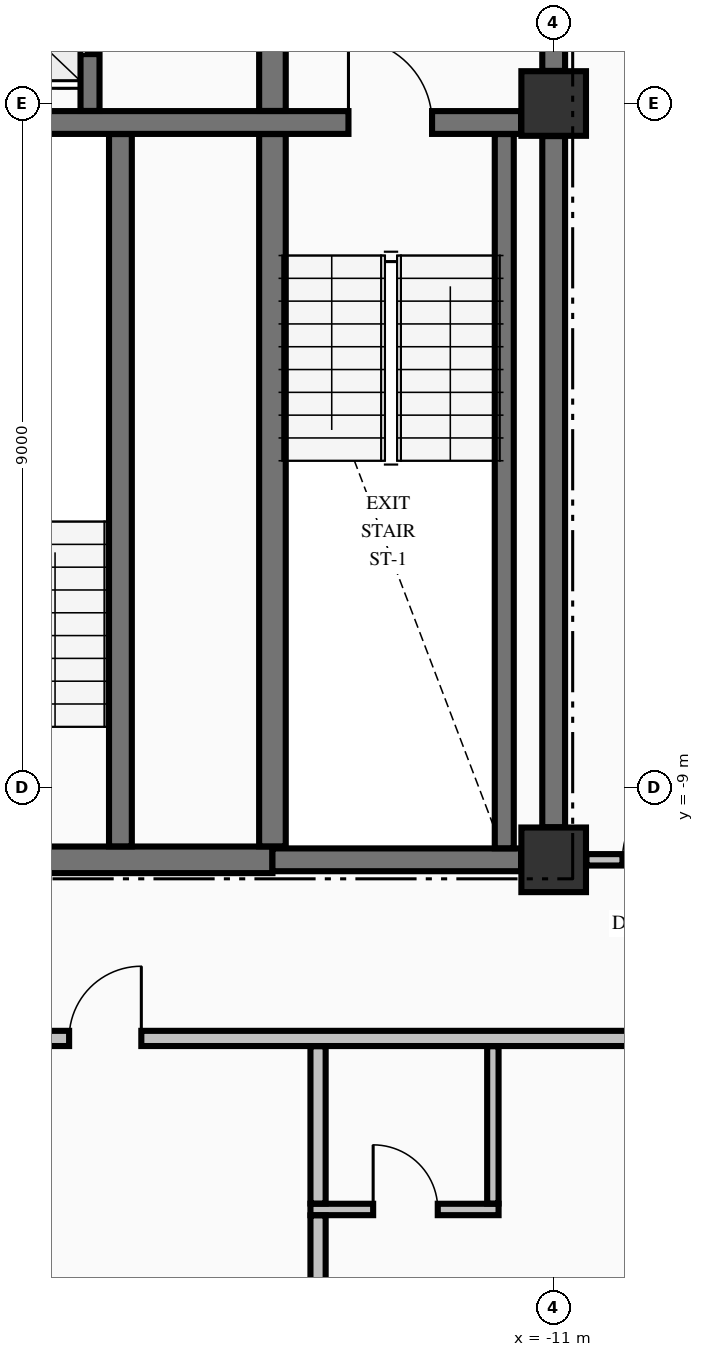
"""IFC4 building model, lengths in metres.
Left out: names, types, materials, properties, quantities, classifications, styles, units other than length and angle.
Written with IfcOpenShell. Run it as: python <this file> out.ifc"""

import sys

from ifc_helpers import new_model, si_unit, direction, frame, frame_2d, origin, origin_2d, place, context, subcontext, project, spatial, rectangle, extrude, element, fill, save


model = new_model("IFC4")
c1 = context("Model", 3, precision=1e-05, world=origin(), true_north=direction((0.0, 1.0)))
c2 = subcontext(c1, "Body", "Model", "MODEL_VIEW")
j1 = project(units=[si_unit("LENGTHUNIT", "METRE"), si_unit("PLANEANGLEUNIT", "RADIAN")], contexts=[c1])
p1 = place(None, origin())
s1 = spatial("IfcSite", under=j1, at=p1, CompositionType="ELEMENT")
p2 = place(p1, origin())
s2 = spatial("IfcBuilding", under=s1, at=p2, CompositionType="ELEMENT")
p3 = place(p2, frame((0.0, 0.0, 211.86)))
s3 = spatial("IfcBuildingStorey", under=s2, at=p3, CompositionType="ELEMENT", Elevation=211.86)
for number, where, z_axis, x_axis in (
    (1, (-11.0, -9.95, -0.325), (0.0, 0.0, 1.0), (1.0, 0.0, 0.0)),
    (2, (-11.0, 0.0, -0.325), (0.0, 0.0, 1.0), (1.0, 0.0, 0.0)),
):
    element("IfcColumn", number, at=place(p3, frame(where, z_axis=z_axis, x_axis=x_axis)), inside=s3, PredefinedType="COLUMN", context=c2, shape_type="SweptSolid", body=[
        extrude(rectangle(XDim=0.85, YDim=0.85, at=origin_2d()), origin(), (0.0, 0.0, 1.0), 3.475),
    ])
p4 = place(p3, frame((-19.571, -9.95, 0.0), z_axis=(0.0, 0.0, 1.0), x_axis=(1.0, 0.0, 0.0)))
e3 = element("IfcWall", 3, at=p4, inside=s3, PredefinedType="SHEAR", context=c2, shape_type="SweptSolid", body=[
    extrude(rectangle(XDim=4.871, YDim=0.35, at=frame_2d((2.436, 0.0))), origin(), (0.0, 0.0, 1.0), 3.15),
])
p5 = place(p4, frame((0.746, 0.0, 0.0)))
e4 = element("IfcOpeningElement", 4, at=p5, cuts=e3, PredefinedType="OPENING", context=c2, shape_type="SweptSolid", body=[
    extrude(rectangle(XDim=1.05, YDim=2.15, at=frame_2d((0.525, 1.075))), frame((0.0, 0.185, 0.0), z_axis=(0.0, -1.0, 0.0), x_axis=(1.0, 0.0, 0.0)), (0.0, 0.0, 1.0), 0.37),
])
p6 = place(p3, frame((-14.7, -9.95, 0.0), z_axis=(0.0, 0.0, 1.0), x_axis=(1.0, 0.0, 0.0)))
e5 = element("IfcWall", 5, at=p6, inside=s3, PredefinedType="SHEAR", context=c2, shape_type="SweptSolid", body=[
    extrude(rectangle(XDim=3.271, YDim=0.3, at=frame_2d((1.635, 0.0))), origin(), (0.0, 0.0, 1.0), 3.15),
])
p7 = place(p3, frame((-19.571, -0.25, 0.0), z_axis=(0.0, 0.0, 1.0), x_axis=(1.0, 0.0, 0.0)))
e6 = element("IfcWall", 6, at=p7, inside=s3, PredefinedType="SHEAR", context=c2, shape_type="SweptSolid", body=[
    extrude(rectangle(XDim=8.142, YDim=0.3, at=frame_2d((4.071, 0.0))), origin(), (0.0, 0.0, 1.0), 3.15),
])
p8 = place(p7, frame((5.871, 0.0, 0.0)))
e7 = element("IfcOpeningElement", 7, at=p8, cuts=e6, PredefinedType="OPENING", context=c2, shape_type="SweptSolid", body=[
    extrude(rectangle(XDim=1.1, YDim=2.15, at=frame_2d((0.55, 1.075))), frame((0.0, 0.16, 0.0), z_axis=(0.0, -1.0, 0.0), x_axis=(1.0, 0.0, 0.0)), (0.0, 0.0, 1.0), 0.32),
])
p9 = place(p3, frame((-14.2, -14.55, 0.0), z_axis=(0.0, 0.0, 1.0), x_axis=(1.0, 0.0, 0.0)))
e8 = element("IfcWall", 8, at=p9, inside=s3, PredefinedType="PARTITIONING", context=c2, shape_type="SweptSolid", body=[
    extrude(rectangle(XDim=2.475, YDim=0.15, at=frame_2d((1.237, 0.0))), origin(), (0.0, 0.0, 1.0), 3.15),
])
p10 = place(p9, frame((0.825, 0.0, 0.0)))
e9 = element("IfcOpeningElement", 9, at=p10, cuts=e8, PredefinedType="OPENING", context=c2, shape_type="SweptSolid", body=[
    extrude(rectangle(XDim=0.85, YDim=2.1, at=frame_2d((0.425, 1.05))), frame((0.0, 0.085, 0.0), z_axis=(0.0, -1.0, 0.0), x_axis=(1.0, 0.0, 0.0)), (0.0, 0.0, 1.0), 0.17),
])
p11 = place(p3, frame((-22.1, -12.3, 0.0), z_axis=(0.0, 0.0, 1.0), x_axis=(1.0, 0.0, 0.0)))
e10 = element("IfcWall", 10, at=p11, inside=s3, PredefinedType="PARTITIONING", context=c2, shape_type="SweptSolid", body=[
    extrude(rectangle(XDim=39.2, YDim=0.2, at=frame_2d((19.6, 0.0))), origin(), (0.0, 0.0, 1.0), 3.15),
])
p12 = place(p11, frame((4.725, 0.0, 0.0)))
e11 = element("IfcOpeningElement", 11, at=p12, cuts=e10, PredefinedType="OPENING", context=c2, shape_type="SweptSolid", body=[
    extrude(rectangle(XDim=0.95, YDim=2.15, at=frame_2d((0.475, 1.075))), frame((0.0, 0.11, 0.0), z_axis=(0.0, -1.0, 0.0), x_axis=(1.0, 0.0, 0.0)), (0.0, 0.0, 1.0), 0.22),
])
p13 = place(p11, frame((12.625, 0.0, 0.0)))
e12 = element("IfcOpeningElement", 12, at=p13, cuts=e10, PredefinedType="OPENING", context=c2, shape_type="SweptSolid", body=[
    extrude(rectangle(XDim=0.95, YDim=2.15, at=frame_2d((0.475, 1.075))), frame((0.0, 0.11, 0.0), z_axis=(0.0, -1.0, 0.0), x_axis=(1.0, 0.0, 0.0)), (0.0, 0.0, 1.0), 0.22),
])
p14 = place(p11, frame((19.375, 0.0, 0.0)))
e13 = element("IfcOpeningElement", 13, at=p14, cuts=e10, PredefinedType="OPENING", context=c2, shape_type="SweptSolid", body=[
    extrude(rectangle(XDim=0.95, YDim=2.15, at=frame_2d((0.475, 1.075))), frame((0.0, 0.11, 0.0), z_axis=(0.0, -1.0, 0.0), x_axis=(1.0, 0.0, 0.0)), (0.0, 0.0, 1.0), 0.22),
])
p15 = place(p11, frame((30.375, 0.0, 0.0)))
e14 = element("IfcOpeningElement", 14, at=p15, cuts=e10, PredefinedType="OPENING", context=c2, shape_type="SweptSolid", body=[
    extrude(rectangle(XDim=0.95, YDim=2.15, at=frame_2d((0.475, 1.075))), frame((0.0, 0.11, 0.0), z_axis=(0.0, -1.0, 0.0), x_axis=(1.0, 0.0, 0.0)), (0.0, 0.0, 1.0), 0.22),
])
p16 = place(p3, frame((-10.569, -9.95, 0.0), z_axis=(0.0, 0.0, 1.0), x_axis=(1.0, 0.0, 0.0)))
e15 = element("IfcWall", 15, at=p16, inside=s3, PredefinedType="PARTITIONING", context=c2, shape_type="SweptSolid", body=[
    extrude(rectangle(XDim=21.138, YDim=0.15, at=frame_2d((10.569, 0.0))), origin(), (0.0, 0.0, 1.0), 3.15),
])
p17 = place(p16, frame((0.474, 0.0, 0.0)))
e16 = element("IfcOpeningElement", 16, at=p17, cuts=e15, PredefinedType="OPENING", context=c2, shape_type="SweptSolid", body=[
    extrude(rectangle(XDim=1.05, YDim=2.15, at=frame_2d((0.525, 1.075))), frame((0.0, 0.085, 0.0), z_axis=(0.0, -1.0, 0.0), x_axis=(1.0, 0.0, 0.0)), (0.0, 0.0, 1.0), 0.17),
])
p18 = place(p16, frame((19.614, 0.0, 0.0)))
e17 = element("IfcOpeningElement", 17, at=p18, cuts=e15, PredefinedType="OPENING", context=c2, shape_type="SweptSolid", body=[
    extrude(rectangle(XDim=1.05, YDim=2.15, at=frame_2d((0.525, 1.075))), frame((0.0, 0.085, 0.0), z_axis=(0.0, -1.0, 0.0), x_axis=(1.0, 0.0, 0.0)), (0.0, 0.0, 1.0), 0.17),
])
p19 = place(p16, frame((11.774, 0.0, 0.0)))
e18 = element("IfcOpeningElement", 18, at=p19, cuts=e15, PredefinedType="OPENING", context=c2, shape_type="SweptSolid", body=[
    extrude(rectangle(XDim=0.95, YDim=2.15, at=frame_2d((0.475, 1.075))), frame((0.0, 0.085, 0.0), z_axis=(0.0, -1.0, 0.0), x_axis=(1.0, 0.0, 0.0)), (0.0, 0.0, 1.0), 0.17),
])
p20 = place(p3, frame((-17.1, -0.098, 0.0), z_axis=(0.0, 0.0, 1.0), x_axis=(0.0, 1.0, 0.0)))
e19 = element("IfcWall", 19, at=p20, inside=s3, PredefinedType="SOLIDWALL", context=c2, shape_type="SweptSolid", body=[
    extrude(rectangle(XDim=2.621, YDim=0.25, at=frame_2d((1.311, 0.0))), origin(), (0.0, 0.0, 1.0), 3.15),
])
p21 = place(p20, frame((0.748, 0.0, 0.0)))
e20 = element("IfcOpeningElement", 20, at=p21, cuts=e19, PredefinedType="OPENING", context=c2, shape_type="SweptSolid", body=[
    extrude(rectangle(XDim=1.1, YDim=2.2, at=frame_2d((0.55, 1.1))), frame((0.0, 0.135, 0.0), z_axis=(0.0, -1.0, 0.0), x_axis=(1.0, 0.0, 0.0)), (0.0, 0.0, 1.0), 0.27),
])
p22 = place(p3, frame((-16.7, -9.773, 0.0), z_axis=(0.0, 0.0, 1.0), x_axis=(0.0, 1.0, 0.0)))
e21 = element("IfcWall", 21, at=p22, inside=s3, PredefinedType="SHEAR", context=c2, shape_type="SweptSolid", body=[
    extrude(rectangle(XDim=9.371, YDim=0.3, at=frame_2d((4.686, 0.0))), origin(), (0.0, 0.0, 1.0), 3.15),
])
p23 = place(p3, frame((-14.7, -9.773, 0.0), z_axis=(0.0, 0.0, 1.0), x_axis=(0.0, 1.0, 0.0)))
e22 = element("IfcWall", 22, at=p23, inside=s3, PredefinedType="SHEAR", context=c2, shape_type="SweptSolid", body=[
    extrude(rectangle(XDim=9.371, YDim=0.35, at=frame_2d((4.686, 0.0))), origin(), (0.0, 0.0, 1.0), 3.15),
])
p24 = place(p3, frame((-14.7, -0.098, 0.0), z_axis=(0.0, 0.0, 1.0), x_axis=(0.0, 1.0, 0.0)))
e23 = element("IfcWall", 23, at=p24, inside=s3, PredefinedType="SHEAR", context=c2, shape_type="SweptSolid", body=[
    extrude(rectangle(XDim=2.846, YDim=0.35, at=frame_2d((1.423, 0.0))), origin(), (0.0, 0.0, 1.0), 3.15),
])
p25 = place(p3, frame((-11.65, -9.798, 0.0), z_axis=(0.0, 0.0, 1.0), x_axis=(0.0, 1.0, 0.0)))
e24 = element("IfcWall", 24, at=p25, inside=s3, PredefinedType="SOLIDWALL", context=c2, shape_type="SweptSolid", body=[
    extrude(rectangle(XDim=9.396, YDim=0.25, at=frame_2d((4.698, 0.0))), origin(), (0.0, 0.0, 1.0), 3.15),
])
p26 = place(p3, frame((-11.0, -9.521, 0.0), z_axis=(0.0, 0.0, 1.0), x_axis=(0.0, 1.0, 0.0)))
e25 = element("IfcWall", 25, at=p26, inside=s3, PredefinedType="SHEAR", context=c2, shape_type="SweptSolid", body=[
    extrude(rectangle(XDim=9.092, YDim=0.3, at=frame_2d((4.546, 0.0))), origin(), (0.0, 0.0, 1.0), 3.15),
])
p27 = place(p3, frame((-11.0, 0.429, 0.0), z_axis=(0.0, 0.0, 1.0), x_axis=(0.0, 1.0, 0.0)))
e26 = element("IfcWall", 26, at=p27, inside=s3, PredefinedType="SHEAR", context=c2, shape_type="SweptSolid", body=[
    extrude(rectangle(XDim=2.319, YDim=0.3, at=frame_2d((1.16, 0.0))), origin(), (0.0, 0.0, 1.0), 3.15),
])
p28 = place(p27, frame((0.671, 0.0, 0.0)))
e27 = element("IfcOpeningElement", 27, at=p28, cuts=e26, PredefinedType="OPENING", context=c2, shape_type="SweptSolid", body=[
    extrude(rectangle(XDim=1.1, YDim=2.15, at=frame_2d((0.55, 1.075))), frame((0.0, 0.16, 0.0), z_axis=(0.0, -1.0, 0.0), x_axis=(1.0, 0.0, 0.0)), (0.0, 0.0, 1.0), 0.32),
])
p29 = place(p3, frame((-14.1, -24.335, 0.0), z_axis=(0.0, 0.0, 1.0), x_axis=(0.0, 1.0, 0.0)))
e28 = element("IfcWall", 28, at=p29, inside=s3, PredefinedType="PARTITIONING", context=c2, shape_type="SweptSolid", body=[
    extrude(rectangle(XDim=9.707, YDim=0.2, at=frame_2d((4.854, 0.0))), origin(), (0.0, 0.0, 1.0), 3.15),
])
p30 = place(p3, frame((-14.1, -14.472, 0.0), z_axis=(0.0, 0.0, 1.0), x_axis=(0.0, 1.0, 0.0)))
e29 = element("IfcWall", 29, at=p30, inside=s3, PredefinedType="PARTITIONING", context=c2, shape_type="SweptSolid", body=[
    extrude(rectangle(XDim=2.069, YDim=0.2, at=frame_2d((1.034, 0.0))), origin(), (0.0, 0.0, 1.0), 3.15),
])
p31 = place(p3, frame((-11.8, -14.472, 0.0), z_axis=(0.0, 0.0, 1.0), x_axis=(0.0, 1.0, 0.0)))
e30 = element("IfcWall", 30, at=p31, inside=s3, PredefinedType="PARTITIONING", context=c2, shape_type="SweptSolid", body=[
    extrude(rectangle(XDim=2.069, YDim=0.15, at=frame_2d((1.034, 0.0))), origin(), (0.0, 0.0, 1.0), 3.15),
])
p32 = place(p8, origin())
e31 = element("IfcDoor", 31, at=p32, inside=s3, OperationType="SINGLE_SWING_LEFT", PredefinedType="DOOR", context=c2, shape_type="SweptSolid", body=[
    extrude(rectangle(XDim=1.1, YDim=2.15, at=frame_2d((0.55, 1.075))), frame((0.0, 0.025, 0.0), z_axis=(0.0, -1.0, 0.0), x_axis=(1.0, 0.0, 0.0)), (0.0, 0.0, 1.0), 0.05),
])
fill(e7, e31)
p33 = place(p21, origin())
e32 = element("IfcDoor", 32, at=p33, inside=s3, OperationType="SLIDING_TO_LEFT", PredefinedType="DOOR", context=c2, shape_type="SweptSolid", body=[
    extrude(rectangle(XDim=1.1, YDim=2.2, at=frame_2d((0.55, 1.1))), frame((0.0, 0.025, 0.0), z_axis=(0.0, -1.0, 0.0), x_axis=(1.0, 0.0, 0.0)), (0.0, 0.0, 1.0), 0.05),
])
fill(e20, e32)
p34 = place(p17, origin())
e33 = element("IfcDoor", 33, at=p34, inside=s3, OperationType="SINGLE_SWING_RIGHT", PredefinedType="DOOR", context=c2, shape_type="SweptSolid", body=[
    extrude(rectangle(XDim=1.05, YDim=2.15, at=frame_2d((0.525, 1.075))), frame((0.0, 0.025, 0.0), z_axis=(0.0, -1.0, 0.0), x_axis=(1.0, 0.0, 0.0)), (0.0, 0.0, 1.0), 0.05),
])
fill(e16, e33)
p35 = place(p12, origin())
e34 = element("IfcDoor", 34, at=p35, inside=s3, OperationType="SINGLE_SWING_RIGHT", PredefinedType="DOOR", context=c2, shape_type="SweptSolid", body=[
    extrude(rectangle(XDim=0.95, YDim=2.15, at=frame_2d((0.475, 1.075))), frame((0.0, 0.025, 0.0), z_axis=(0.0, -1.0, 0.0), x_axis=(1.0, 0.0, 0.0)), (0.0, 0.0, 1.0), 0.05),
])
fill(e11, e34)
p36 = place(p10, origin())
e35 = element("IfcDoor", 35, at=p36, inside=s3, OperationType="SINGLE_SWING_LEFT", PredefinedType="DOOR", context=c2, shape_type="SweptSolid", body=[
    extrude(rectangle(XDim=0.85, YDim=2.1, at=frame_2d((0.425, 1.05))), frame((0.0, 0.025, 0.0), z_axis=(0.0, -1.0, 0.0), x_axis=(1.0, 0.0, 0.0)), (0.0, 0.0, 1.0), 0.05),
])
fill(e9, e35)
save(model, sys.argv[1])
